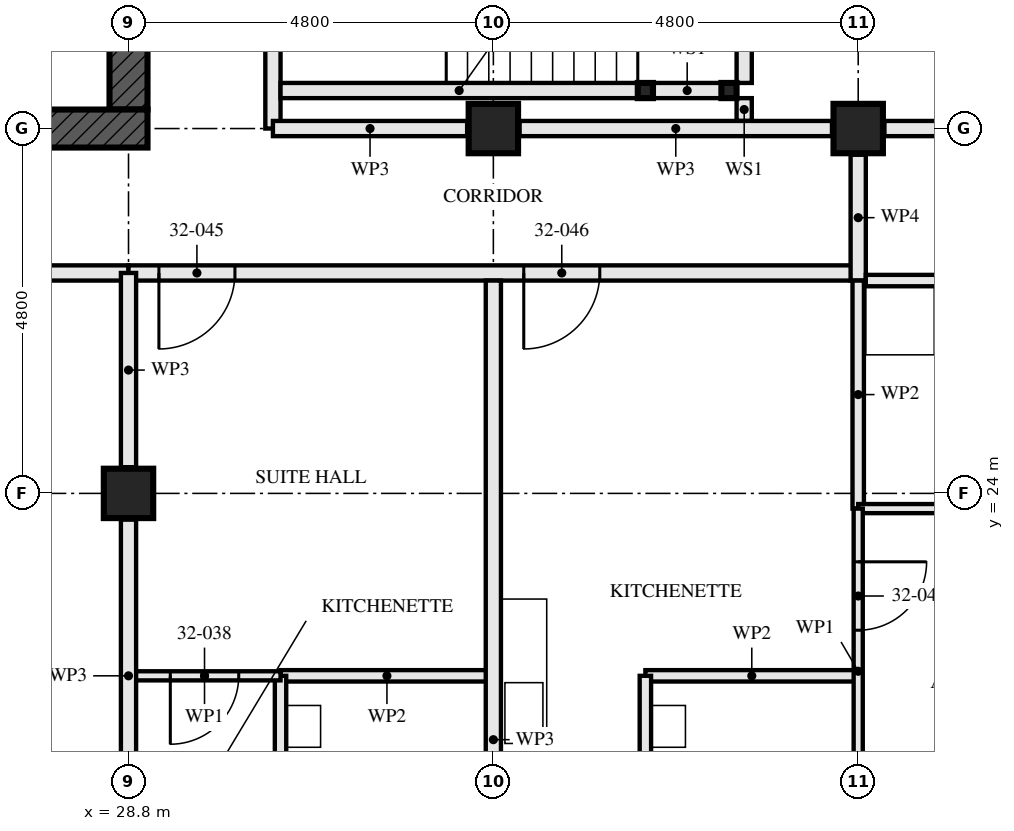
"""IFC4 building model, lengths in metres.
Left out: names, types, materials, properties, quantities, classifications, styles, units other than length and angle.
Written with IfcOpenShell. Run it as: python <this file> out.ifc"""

import sys

from ifc_helpers import new_model, si_unit, direction, frame, frame_2d, origin, origin_2d, place, context, subcontext, project, spatial, rectangle, hollow_rectangle, extrude, element, fill, save


model = new_model("IFC4")
c1 = context("Model", 3, precision=1e-05, world=origin(), true_north=direction((0.0, 1.0)))
c2 = subcontext(c1, "Body", "Model", "MODEL_VIEW")
j1 = project(units=[si_unit("LENGTHUNIT", "METRE"), si_unit("PLANEANGLEUNIT", "RADIAN")], contexts=[c1])
p1 = place(None, origin())
s1 = spatial("IfcSite", under=j1, at=p1, CompositionType="ELEMENT")
p2 = place(p1, origin())
s2 = spatial("IfcBuilding", under=s1, at=p2, CompositionType="ELEMENT")
p3 = place(p2, frame((0.0, 0.0, 119.0)))
s3 = spatial("IfcBuildingStorey", under=s2, at=p3, CompositionType="ELEMENT", Elevation=119.0)
for number, where, z_axis, x_axis in (
    (1, (28.8, 24.0, 0.0), (0.0, 0.0, 1.0), (1.0, 0.0, 0.0)),
    (2, (33.6, 28.8, 0.0), (0.0, 0.0, 1.0), (0.0, 1.0, 0.0)),
    (3, (38.4, 28.8, 0.0), (0.0, 0.0, 1.0), (0.0, 1.0, 0.0)),
):
    element("IfcColumn", number, at=place(p3, frame(where, z_axis=z_axis, x_axis=x_axis)), inside=s3, PredefinedType="COLUMN", context=c2, shape_type="SweptSolid", body=[
        extrude(hollow_rectangle(XDim=0.65, YDim=0.65, WallThickness=0.05, at=origin_2d()), origin(), (0.0, 0.0, 1.0), 3.5),
    ])
p4 = place(p3, frame((14.15, 28.8, -0.17), z_axis=(0.0, 0.0, 1.0), x_axis=(1.0, 0.0, 0.0)))
e4 = element("IfcWall", 4, at=p4, inside=s3, PredefinedType="SHEAR", context=c2, shape_type="SweptSolid", body=[
    extrude(rectangle(XDim=14.9, YDim=0.5, at=frame_2d((7.45, 0.0))), origin(), (0.0, 0.0, 1.0), 3.5),
])
p5 = place(p4, frame((6.85, 0.0, 0.17)))
e5 = element("IfcOpeningElement", 5, at=p5, cuts=e4, PredefinedType="OPENING", context=c2, shape_type="SweptSolid", body=[
    extrude(rectangle(XDim=1.2, YDim=2.1, at=frame_2d((0.6, 1.05))), frame((0.0, 0.26, 0.0), z_axis=(0.0, -1.0, 0.0), x_axis=(1.0, 0.0, 0.0)), (0.0, 0.0, 1.0), 0.521),
])
p6 = place(p3, frame((28.8, 29.05, -0.17), z_axis=(0.0, 0.0, 1.0), x_axis=(0.0, 1.0, 0.0)))
e6 = element("IfcWall", 6, at=p6, inside=s3, PredefinedType="SHEAR", context=c2, shape_type="SweptSolid", body=[
    extrude(rectangle(XDim=13.9, YDim=0.5, at=frame_2d((6.95, 0.0))), origin(), (0.0, 0.0, 1.0), 3.5),
])
p7 = place(p6, frame((6.35, 0.0, 0.17)))
e7 = element("IfcOpeningElement", 7, at=p7, cuts=e6, PredefinedType="OPENING", context=c2, shape_type="SweptSolid", body=[
    extrude(rectangle(XDim=1.2, YDim=2.1, at=frame_2d((0.6, 1.05))), frame((0.0, 0.26, 0.0), z_axis=(0.0, -1.0, 0.0), x_axis=(1.0, 0.0, 0.0)), (0.0, 0.0, 1.0), 0.521),
])
for number, where, z_axis, x_axis in (
    (8, (36.7, 29.3, 0.0), (0.0, 0.0, 1.0), (1.0, 0.0, 0.0)),
    (9, (35.6, 29.3, 0.0), (0.0, 0.0, 1.0), (1.0, 0.0, 0.0)),
):
    element("IfcColumn", number, at=place(p3, frame(where, z_axis=z_axis, x_axis=x_axis)), inside=s3, PredefinedType="COLUMN", context=c2, shape_type="SweptSolid", body=[
        extrude(hollow_rectangle(XDim=0.2, YDim=0.2, WallThickness=0.008, at=origin_2d()), origin(), (0.0, 0.0, 1.0), 3.33),
    ])
p8 = place(p3, frame((13.96, 26.9, 0.0), z_axis=(0.0, 0.0, 1.0), x_axis=(1.0, 0.0, 0.0)))
e10 = element("IfcWall", 10, at=p8, inside=s3, PredefinedType="PARTITIONING", context=c2, shape_type="SweptSolid", body=[
    extrude(rectangle(XDim=14.84, YDim=0.2, at=frame_2d((7.42, 0.0))), origin(), (0.0, 0.0, 1.0), 2.32),
])
p9 = place(p8, frame((1.84, 0.0, 0.0)))
e11 = element("IfcOpeningElement", 11, at=p9, cuts=e10, PredefinedType="OPENING", context=c2, shape_type="SweptSolid", body=[
    extrude(rectangle(XDim=1.0, YDim=2.1, at=frame_2d((0.5, 1.05))), frame((0.0, 0.111, 0.0), z_axis=(0.0, -1.0, 0.0), x_axis=(1.0, 0.0, 0.0)), (0.0, 0.0, 1.0), 0.221),
])
p10 = place(p8, frame((4.09, 0.0, 0.0)))
e12 = element("IfcOpeningElement", 12, at=p10, cuts=e10, PredefinedType="OPENING", context=c2, shape_type="SweptSolid", body=[
    extrude(rectangle(XDim=0.9, YDim=2.1, at=frame_2d((0.45, 1.05))), frame((0.0, 0.111, 0.0), z_axis=(0.0, -1.0, 0.0), x_axis=(1.0, 0.0, 0.0)), (0.0, 0.0, 1.0), 0.221),
])
p11 = place(p8, frame((5.64, 0.0, 0.0)))
e13 = element("IfcOpeningElement", 13, at=p11, cuts=e10, PredefinedType="OPENING", context=c2, shape_type="SweptSolid", body=[
    extrude(rectangle(XDim=1.0, YDim=2.1, at=frame_2d((0.5, 1.05))), frame((0.0, 0.111, 0.0), z_axis=(0.0, -1.0, 0.0), x_axis=(1.0, 0.0, 0.0)), (0.0, 0.0, 1.0), 0.221),
])
p12 = place(p3, frame((30.8, 18.6, 0.0), z_axis=(0.0, 0.0, 1.0), x_axis=(0.0, 1.0, 0.0)))
e14 = element("IfcWall", 14, at=p12, inside=s3, PredefinedType="PARTITIONING", context=c2, shape_type="SweptSolid", body=[
    extrude(rectangle(XDim=3.0, YDim=0.15, at=frame_2d((1.5, 0.0))), origin(), (0.0, 0.0, 1.0), 2.55),
])
p13 = place(p3, frame((30.8, 21.6, 0.0), z_axis=(0.0, 0.0, 1.0), x_axis=(1.0, 0.0, 0.0)))
e15 = element("IfcWall", 15, at=p13, inside=s3, PredefinedType="PARTITIONING", context=c2, shape_type="SweptSolid", body=[
    extrude(rectangle(XDim=2.8, YDim=0.15, at=frame_2d((1.4, 0.0))), origin(), (0.0, 0.0, 1.0), 3.33),
])
p14 = place(p3, frame((28.8, 21.6, 0.0), z_axis=(0.0, 0.0, 1.0), x_axis=(1.0, 0.0, 0.0)))
e16 = element("IfcWall", 16, at=p14, inside=s3, PredefinedType="PARTITIONING", context=c2, shape_type="SweptSolid", body=[
    extrude(rectangle(XDim=2.0, YDim=0.12, at=frame_2d((1.0, 0.0))), origin(), (0.0, 0.0, 1.0), 3.33),
])
p15 = place(p14, frame((0.55, 0.0, 0.0)))
e17 = element("IfcOpeningElement", 17, at=p15, cuts=e16, PredefinedType="OPENING", context=c2, shape_type="SweptSolid", body=[
    extrude(rectangle(XDim=0.9, YDim=2.1, at=frame_2d((0.45, 1.05))), frame((0.0, 0.071, 0.0), z_axis=(0.0, -1.0, 0.0), x_axis=(1.0, 0.0, 0.0)), (0.0, 0.0, 1.0), 0.141),
])
p16 = place(p3, frame((33.6, 14.72, 0.0), z_axis=(0.0, 0.0, 1.0), x_axis=(0.0, 1.0, 0.0)))
e18 = element("IfcWall", 18, at=p16, inside=s3, PredefinedType="PARTITIONING", context=c2, shape_type="SweptSolid", body=[
    extrude(rectangle(XDim=12.08, YDim=0.2, at=frame_2d((6.04, 0.0))), origin(), (0.0, 0.0, 1.0), 2.55),
])
p17 = place(p3, frame((35.6, 18.6, 0.0), z_axis=(0.0, 0.0, 1.0), x_axis=(0.0, 1.0, 0.0)))
e19 = element("IfcWall", 19, at=p17, inside=s3, PredefinedType="PARTITIONING", context=c2, shape_type="SweptSolid", body=[
    extrude(rectangle(XDim=3.0, YDim=0.15, at=frame_2d((1.5, 0.0))), origin(), (0.0, 0.0, 1.0), 2.55),
])
p18 = place(p3, frame((35.6, 21.6, 0.0), z_axis=(0.0, 0.0, 1.0), x_axis=(1.0, 0.0, 0.0)))
e20 = element("IfcWall", 20, at=p18, inside=s3, PredefinedType="PARTITIONING", context=c2, shape_type="SweptSolid", body=[
    extrude(rectangle(XDim=2.8, YDim=0.15, at=frame_2d((1.4, 0.0))), origin(), (0.0, 0.0, 1.0), 3.33),
])
p19 = place(p3, frame((38.4, 23.8, 0.0), z_axis=(0.0, 0.0, 1.0), x_axis=(0.0, 1.0, 0.0)))
e21 = element("IfcWall", 21, at=p19, inside=s3, PredefinedType="PARTITIONING", context=c2, shape_type="SweptSolid", body=[
    extrude(rectangle(XDim=3.0, YDim=0.15, at=frame_2d((1.5, 0.0))), origin(), (0.0, 0.0, 1.0), 2.55),
])
p20 = place(p3, frame((38.4, 23.8, 0.0), z_axis=(0.0, 0.0, 1.0), x_axis=(1.0, 0.0, 0.0)))
e22 = element("IfcWall", 22, at=p20, inside=s3, PredefinedType="PARTITIONING", context=c2, shape_type="SweptSolid", body=[
    extrude(rectangle(XDim=4.48, YDim=0.12, at=frame_2d((2.24, 0.0))), origin(), (0.0, 0.0, 1.0), 3.33),
])
p21 = place(p20, frame((1.925, 0.0, 0.0)))
e23 = element("IfcOpeningElement", 23, at=p21, cuts=e22, PredefinedType="OPENING", context=c2, shape_type="SweptSolid", body=[
    extrude(rectangle(XDim=0.95, YDim=2.1, at=frame_2d((0.475, 1.05))), frame((0.0, 0.071, 0.0), z_axis=(0.0, -1.0, 0.0), x_axis=(1.0, 0.0, 0.0)), (0.0, 0.0, 1.0), 0.141),
])
p22 = place(p3, frame((38.4, 19.52, 0.0), z_axis=(0.0, 0.0, 1.0), x_axis=(0.0, 1.0, 0.0)))
e24 = element("IfcWall", 24, at=p22, inside=s3, PredefinedType="PARTITIONING", context=c2, shape_type="SweptSolid", body=[
    extrude(rectangle(XDim=4.28, YDim=0.12, at=frame_2d((2.14, 0.0))), origin(), (0.0, 0.0, 1.0), 3.33),
])
p23 = place(p22, frame((2.68, 0.0, 0.0)))
e25 = element("IfcOpeningElement", 25, at=p23, cuts=e24, PredefinedType="OPENING", context=c2, shape_type="SweptSolid", body=[
    extrude(rectangle(XDim=0.9, YDim=2.1, at=frame_2d((0.45, 1.05))), frame((0.0, 0.071, 0.0), z_axis=(0.0, -1.0, 0.0), x_axis=(1.0, 0.0, 0.0)), (0.0, 0.0, 1.0), 0.141),
])
p24 = place(p3, frame((28.8, 26.9, 0.0), z_axis=(0.0, 0.0, 1.0), x_axis=(1.0, 0.0, 0.0)))
e26 = element("IfcWall", 26, at=p24, inside=s3, PredefinedType="PARTITIONING", context=c2, shape_type="SweptSolid", body=[
    extrude(rectangle(XDim=9.6, YDim=0.2, at=frame_2d((4.8, 0.0))), origin(), (0.0, 0.0, 1.0), 3.33),
])
p25 = place(p24, frame((0.4, 0.0, 0.0)))
e27 = element("IfcOpeningElement", 27, at=p25, cuts=e26, PredefinedType="OPENING", context=c2, shape_type="SweptSolid", body=[
    extrude(rectangle(XDim=1.0, YDim=2.1, at=frame_2d((0.5, 1.05))), frame((0.0, 0.111, 0.0), z_axis=(0.0, -1.0, 0.0), x_axis=(1.0, 0.0, 0.0)), (0.0, 0.0, 1.0), 0.221),
])
p26 = place(p24, frame((5.2, 0.0, 0.0)))
e28 = element("IfcOpeningElement", 28, at=p26, cuts=e26, PredefinedType="OPENING", context=c2, shape_type="SweptSolid", body=[
    extrude(rectangle(XDim=1.0, YDim=2.1, at=frame_2d((0.5, 1.05))), frame((0.0, 0.111, 0.0), z_axis=(0.0, -1.0, 0.0), x_axis=(1.0, 0.0, 0.0)), (0.0, 0.0, 1.0), 0.221),
])
p27 = place(p3, frame((38.4, 26.8, 0.0), z_axis=(0.0, 0.0, 1.0), x_axis=(0.0, 1.0, 0.0)))
e29 = element("IfcWall", 29, at=p27, inside=s3, PredefinedType="PARTITIONING", context=c2, shape_type="SweptSolid", body=[
    extrude(rectangle(XDim=1.655, YDim=0.2, at=frame_2d((0.828, 0.0))), origin(), (0.0, 0.0, 1.0), 3.33),
])
p28 = place(p3, frame((36.6, 29.3, 0.0), z_axis=(0.0, 0.0, 1.0), x_axis=(-1.0, 0.0, 0.0)))
e30 = element("IfcWall", 30, at=p28, inside=s3, PredefinedType="SOLIDWALL", context=c2, shape_type="SweptSolid", body=[
    extrude(rectangle(XDim=0.9, YDim=0.2, at=frame_2d((0.45, 0.0))), origin(), (0.0, 0.0, 1.0), 2.99),
])
p29 = place(p3, frame((35.5, 29.3, 0.0), z_axis=(0.0, 0.0, 1.0), x_axis=(-1.0, 0.0, 0.0)))
e31 = element("IfcWall", 31, at=p29, inside=s3, PredefinedType="SOLIDWALL", context=c2, shape_type="SweptSolid", body=[
    extrude(rectangle(XDim=4.7, YDim=0.2, at=frame_2d((2.35, 0.0))), origin(), (0.0, 0.0, 1.0), 2.99),
])
p30 = place(p3, frame((36.9, 28.9, 0.0), z_axis=(0.0, 0.0, 1.0), x_axis=(0.0, 1.0, 0.0)))
e32 = element("IfcWall", 32, at=p30, inside=s3, PredefinedType="SOLIDWALL", context=c2, shape_type="SweptSolid", body=[
    extrude(rectangle(XDim=0.3, YDim=0.2, at=frame_2d((0.15, 0.0))), origin(), (0.0, 0.0, 1.0), 3.33),
])
p31 = place(p3, frame((36.9, 29.4, 0.0), z_axis=(0.0, 0.0, 1.0), x_axis=(0.0, 1.0, 0.0)))
e33 = element("IfcWall", 33, at=p31, inside=s3, PredefinedType="SOLIDWALL", context=c2, shape_type="SweptSolid", body=[
    extrude(rectangle(XDim=2.6, YDim=0.2, at=frame_2d((1.3, 0.0))), origin(), (0.0, 0.0, 1.0), 3.33),
])
p32 = place(p3, frame((30.7, 28.8, 0.0), z_axis=(0.0, 0.0, 1.0), x_axis=(0.0, 1.0, 0.0)))
e34 = element("IfcWall", 34, at=p32, inside=s3, PredefinedType="PARTITIONING", context=c2, shape_type="SweptSolid", body=[
    extrude(rectangle(XDim=14.84, YDim=0.2, at=frame_2d((7.42, 0.0))), origin(), (0.0, 0.0, 1.0), 2.32),
])
p33 = place(p32, frame((1.4, 0.0, 0.0)))
e35 = element("IfcOpeningElement", 35, at=p33, cuts=e34, PredefinedType="OPENING", context=c2, shape_type="SweptSolid", body=[
    extrude(rectangle(XDim=1.0, YDim=2.1, at=frame_2d((0.5, 1.05))), frame((0.0, 0.111, 0.0), z_axis=(0.0, -1.0, 0.0), x_axis=(1.0, 0.0, 0.0)), (0.0, 0.0, 1.0), 0.221),
])
p34 = place(p32, frame((4.1, 0.0, 0.0)))
e36 = element("IfcOpeningElement", 36, at=p34, cuts=e34, PredefinedType="OPENING", context=c2, shape_type="SweptSolid", body=[
    extrude(rectangle(XDim=1.0, YDim=2.1, at=frame_2d((0.5, 1.05))), frame((0.0, 0.111, 0.0), z_axis=(0.0, -1.0, 0.0), x_axis=(1.0, 0.0, 0.0)), (0.0, 0.0, 1.0), 0.221),
])
p35 = place(p32, frame((5.975, 0.0, 0.0)))
e37 = element("IfcOpeningElement", 37, at=p35, cuts=e34, PredefinedType="OPENING", context=c2, shape_type="SweptSolid", body=[
    extrude(rectangle(XDim=1.0, YDim=2.1, at=frame_2d((0.5, 1.05))), frame((0.0, 0.111, 0.0), z_axis=(0.0, -1.0, 0.0), x_axis=(1.0, 0.0, 0.0)), (0.0, 0.0, 1.0), 0.221),
])
p36 = place(p32, frame((13.0, 0.0, 0.0)))
e38 = element("IfcOpeningElement", 38, at=p36, cuts=e34, PredefinedType="OPENING", context=c2, shape_type="SweptSolid", body=[
    extrude(rectangle(XDim=1.0, YDim=2.1, at=frame_2d((0.5, 1.05))), frame((0.0, 0.111, 0.0), z_axis=(0.0, -1.0, 0.0), x_axis=(1.0, 0.0, 0.0)), (0.0, 0.0, 1.0), 0.221),
])
p37 = place(p3, frame((28.8, 19.545, 0.0), z_axis=(0.0, 0.0, 1.0), x_axis=(0.0, 1.0, 0.0)))
e39 = element("IfcWall", 39, at=p37, inside=s3, PredefinedType="PARTITIONING", context=c2, shape_type="SweptSolid", body=[
    extrude(rectangle(XDim=4.11, YDim=0.2, at=frame_2d((2.055, 0.0))), origin(), (0.0, 0.0, 1.0), 2.32),
])
p38 = place(p3, frame((28.8, 24.345, 0.0), z_axis=(0.0, 0.0, 1.0), x_axis=(0.0, 1.0, 0.0)))
e40 = element("IfcWall", 40, at=p38, inside=s3, PredefinedType="PARTITIONING", context=c2, shape_type="SweptSolid", body=[
    extrude(rectangle(XDim=2.555, YDim=0.2, at=frame_2d((1.277, 0.0))), origin(), (0.0, 0.0, 1.0), 2.32),
])
p39 = place(p3, frame((42.88, 28.8, 0.0), z_axis=(0.0, 0.0, 1.0), x_axis=(-1.0, 0.0, 0.0)))
e41 = element("IfcWall", 41, at=p39, inside=s3, PredefinedType="PARTITIONING", context=c2, shape_type="SweptSolid", body=[
    extrude(rectangle(XDim=4.135, YDim=0.2, at=frame_2d((2.067, 0.0))), origin(), (0.0, 0.0, 1.0), 2.32),
])
p40 = place(p3, frame((38.055, 28.8, 0.0), z_axis=(0.0, 0.0, 1.0), x_axis=(-1.0, 0.0, 0.0)))
e42 = element("IfcWall", 42, at=p40, inside=s3, PredefinedType="PARTITIONING", context=c2, shape_type="SweptSolid", body=[
    extrude(rectangle(XDim=4.11, YDim=0.2, at=frame_2d((2.055, 0.0))), origin(), (0.0, 0.0, 1.0), 2.32),
])
p41 = place(p3, frame((33.255, 28.8, 0.0), z_axis=(0.0, 0.0, 1.0), x_axis=(-1.0, 0.0, 0.0)))
e43 = element("IfcWall", 43, at=p41, inside=s3, PredefinedType="PARTITIONING", context=c2, shape_type="SweptSolid", body=[
    extrude(rectangle(XDim=2.555, YDim=0.2, at=frame_2d((1.277, 0.0))), origin(), (0.0, 0.0, 1.0), 2.32),
])
p42 = place(p3, frame((38.5, 26.8, 0.0), z_axis=(0.0, 0.0, 1.0), x_axis=(1.0, 0.0, 0.0)))
e44 = element("IfcWall", 44, at=p42, inside=s3, PredefinedType="PARTITIONING", context=c2, shape_type="SweptSolid", body=[
    extrude(rectangle(XDim=5.14, YDim=0.15, at=frame_2d((2.57, 0.0))), origin(), (0.0, 0.0, 1.0), 2.32),
])
p43 = place(p15, frame((0.9, 0.0, 0.0), z_axis=(0.0, 0.0, 1.0), x_axis=(-1.0, 0.0, 0.0)))
e45 = element("IfcDoor", 45, at=p43, inside=s3, OperationType="SINGLE_SWING_LEFT", PredefinedType="DOOR", context=c2, shape_type="SweptSolid", body=[
    extrude(rectangle(XDim=0.9, YDim=2.1, at=frame_2d((0.45, 1.05))), frame((0.0, 0.022, 0.0), z_axis=(0.0, -1.0, 0.0), x_axis=(1.0, 0.0, 0.0)), (0.0, 0.0, 1.0), 0.044),
])
fill(e17, e45)
p44 = place(p23, frame((0.9, 0.0, 0.0), z_axis=(0.0, 0.0, 1.0), x_axis=(-1.0, 0.0, 0.0)))
e46 = element("IfcDoor", 46, at=p44, inside=s3, OperationType="SINGLE_SWING_RIGHT", PredefinedType="DOOR", context=c2, shape_type="SweptSolid", body=[
    extrude(rectangle(XDim=0.9, YDim=2.1, at=frame_2d((0.45, 1.05))), frame((0.0, 0.022, 0.0), z_axis=(0.0, -1.0, 0.0), x_axis=(1.0, 0.0, 0.0)), (0.0, 0.0, 1.0), 0.044),
])
fill(e25, e46)
p45 = place(p25, frame((1.0, 0.0, 0.0), z_axis=(0.0, 0.0, 1.0), x_axis=(-1.0, 0.0, 0.0)))
e47 = element("IfcDoor", 47, at=p45, inside=s3, OperationType="SINGLE_SWING_LEFT", PredefinedType="DOOR", context=c2, shape_type="SweptSolid", body=[
    extrude(rectangle(XDim=1.0, YDim=2.1, at=frame_2d((0.5, 1.05))), frame((0.0, 0.027, 0.0), z_axis=(0.0, -1.0, 0.0), x_axis=(1.0, 0.0, 0.0)), (0.0, 0.0, 1.0), 0.054),
])
fill(e27, e47)
p46 = place(p26, frame((1.0, 0.0, 0.0), z_axis=(0.0, 0.0, 1.0), x_axis=(-1.0, 0.0, 0.0)))
e48 = element("IfcDoor", 48, at=p46, inside=s3, OperationType="SINGLE_SWING_LEFT", PredefinedType="DOOR", context=c2, shape_type="SweptSolid", body=[
    extrude(rectangle(XDim=1.0, YDim=2.1, at=frame_2d((0.5, 1.05))), frame((0.0, 0.027, 0.0), z_axis=(0.0, -1.0, 0.0), x_axis=(1.0, 0.0, 0.0)), (0.0, 0.0, 1.0), 0.054),
])
fill(e28, e48)
save(model, sys.argv[1])
